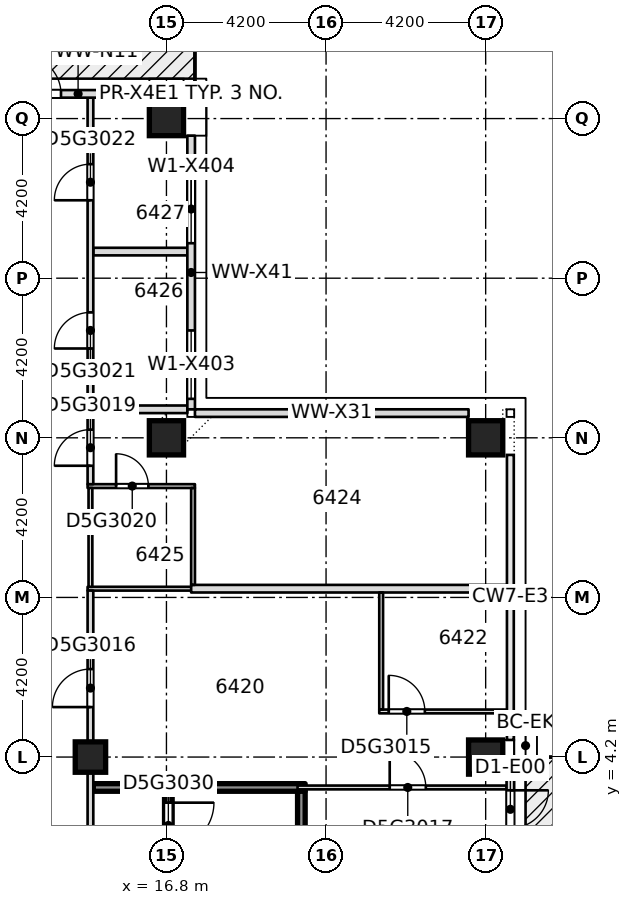
"""IFC4 building model, lengths in metres.
Left out: names, types, materials, properties, quantities, classifications, styles, units other than length and angle.
Written with IfcOpenShell. Run it as: python <this file> out.ifc"""

import sys

from ifc_helpers import new_model, si_unit, direction, frame, frame_2d, origin, origin_2d, place, context, subcontext, project, spatial, rectangle, extrude, element, fill, save


model = new_model("IFC4")
c1 = context("Model", 3, precision=1e-05, world=origin(), true_north=direction((0.0, 1.0)))
c2 = subcontext(c1, "Body", "Model", "MODEL_VIEW")
j1 = project(units=[si_unit("LENGTHUNIT", "METRE"), si_unit("PLANEANGLEUNIT", "RADIAN")], contexts=[c1])
p1 = place(None, origin())
s1 = spatial("IfcSite", under=j1, at=p1, CompositionType="ELEMENT")
p2 = place(p1, origin())
s2 = spatial("IfcBuilding", under=s1, at=p2, CompositionType="ELEMENT")
p3 = place(p2, frame((0.0, 0.0, 244.15)))
s3 = spatial("IfcBuildingStorey", under=s2, at=p3, CompositionType="ELEMENT", Elevation=244.15)
for number, where, z_axis, x_axis in (
    (1, (25.2, 4.2, -0.4), (0.0, 0.0, 1.0), (1.0, 0.0, 0.0)),
    (2, (16.8, 12.6, -0.4), (0.0, 0.0, 1.0), (1.0, 0.0, 0.0)),
    (3, (25.2, 12.6, -0.4), (0.0, 0.0, 1.0), (1.0, 0.0, 0.0)),
    (4, (16.8, 21.0, -0.4), (0.0, 0.0, 1.0), (1.0, 0.0, 0.0)),
):
    element("IfcColumn", number, at=place(p3, frame(where, z_axis=z_axis, x_axis=x_axis)), inside=s3, PredefinedType="COLUMN", context=c2, shape_type="SweptSolid", body=[
        extrude(rectangle(XDim=0.9, YDim=0.9, at=origin_2d()), origin(), (0.0, 0.0, 1.0), 3.45),
    ])
p4 = place(p3, frame((14.8, 4.2, -0.4), z_axis=(0.0, 0.0, 1.0), x_axis=(1.0, 0.0, 0.0)))
e5 = element("IfcColumn", 5, at=p4, inside=s3, PredefinedType="COLUMN", context=c2, shape_type="SweptSolid", body=[
    extrude(rectangle(XDim=0.8, YDim=0.8, at=origin_2d()), origin(), (0.0, 0.0, 1.0), 3.45),
])
p5 = place(p3, frame((14.875, 3.4, 0.0), z_axis=(0.0, 0.0, 1.0), x_axis=(1.0, 0.0, 0.0)))
e6 = element("IfcWall", 6, at=p5, inside=s3, PredefinedType="SOLIDWALL", context=c2, shape_type="SweptSolid", body=[
    extrude(rectangle(XDim=5.575, YDim=0.2, at=frame_2d((2.788, 0.0))), origin(), (0.0, 0.0, 1.0), 3.05),
])
p6 = place(p3, frame((20.25, 3.4, 0.0), z_axis=(0.0, 0.0, 1.0), x_axis=(1.0, 0.0, 0.0)))
e7 = element("IfcWall", 7, at=p6, inside=s3, PredefinedType="PARTITIONING", context=c2, shape_type="SweptSolid", body=[
    extrude(rectangle(XDim=5.5, YDim=0.1, at=frame_2d((2.75, 0.0))), origin(), (0.0, 0.0, 1.0), 3.05),
])
p7 = place(p6, frame((2.425, 0.0, 0.0)))
e8 = element("IfcOpeningElement", 8, at=p7, cuts=e7, PredefinedType="OPENING", context=c2, shape_type="SweptSolid", body=[
    extrude(rectangle(XDim=0.95, YDim=2.1, at=frame_2d((0.475, 1.05))), frame((0.0, 0.06, 0.0), z_axis=(0.0, -1.0, 0.0), x_axis=(1.0, 0.0, 0.0)), (0.0, 0.0, 1.0), 0.12),
])
p8 = place(p3, frame((22.4, 5.4, 0.0), z_axis=(0.0, 0.0, 1.0), x_axis=(1.0, 0.0, 0.0)))
e9 = element("IfcWall", 9, at=p8, inside=s3, PredefinedType="PARTITIONING", context=c2, shape_type="SweptSolid", body=[
    extrude(rectangle(XDim=3.35, YDim=0.1, at=frame_2d((1.675, 0.0))), origin(), (0.0, 0.0, 1.0), 3.05),
])
p9 = place(p8, frame((0.25, 0.0, 0.0)))
e10 = element("IfcOpeningElement", 10, at=p9, cuts=e9, PredefinedType="OPENING", context=c2, shape_type="SweptSolid", body=[
    extrude(rectangle(XDim=0.95, YDim=2.1, at=frame_2d((0.475, 1.05))), frame((0.0, 0.06, 0.0), z_axis=(0.0, -1.0, 0.0), x_axis=(1.0, 0.0, 0.0)), (0.0, 0.0, 1.0), 0.12),
])
p10 = place(p3, frame((14.725, 8.63, 0.0), z_axis=(0.0, 0.0, 1.0), x_axis=(1.0, 0.0, 0.0)))
e11 = element("IfcWall", 11, at=p10, inside=s3, PredefinedType="PARTITIONING", context=c2, shape_type="SweptSolid", body=[
    extrude(rectangle(XDim=2.825, YDim=0.1, at=frame_2d((1.413, 0.0))), origin(), (0.0, 0.0, 1.0), 3.05),
])
p11 = place(p3, frame((17.45, 8.63, 0.0), z_axis=(0.0, 0.0, 1.0), x_axis=(1.0, 0.0, 0.0)))
e12 = element("IfcWall", 12, at=p11, inside=s3, PredefinedType="PARTITIONING", context=c2, shape_type="SweptSolid", body=[
    extrude(rectangle(XDim=8.3, YDim=0.2, at=frame_2d((4.15, 0.0))), origin(), (0.0, 0.0, 1.0), 3.05),
])
p12 = place(p3, frame((14.725, 11.33, 0.0), z_axis=(0.0, 0.0, 1.0), x_axis=(1.0, 0.0, 0.0)))
e13 = element("IfcWall", 13, at=p12, inside=s3, PredefinedType="PARTITIONING", context=c2, shape_type="SweptSolid", body=[
    extrude(rectangle(XDim=2.825, YDim=0.1, at=frame_2d((1.413, 0.0))), origin(), (0.0, 0.0, 1.0), 3.05),
])
p13 = place(p12, frame((0.75, 0.0, 0.0)))
e14 = element("IfcOpeningElement", 14, at=p13, cuts=e13, PredefinedType="OPENING", context=c2, shape_type="SweptSolid", body=[
    extrude(rectangle(XDim=0.85, YDim=2.1, at=frame_2d((0.425, 1.05))), frame((0.0, 0.06, 0.0), z_axis=(0.0, -1.0, 0.0), x_axis=(1.0, 0.0, 0.0)), (0.0, 0.0, 1.0), 0.12),
])
for number, where, z_axis, x_axis in (
    (15, (14.875, 13.35, 0.0), (0.0, 0.0, 1.0), (1.0, 0.0, 0.0)),
    (16, (14.875, 17.5, 0.0), (0.0, 0.0, 1.0), (1.0, 0.0, 0.0)),
):
    element("IfcWall", number, at=place(p3, frame(where, z_axis=z_axis, x_axis=x_axis)), inside=s3, PredefinedType="PARTITIONING", context=c2, shape_type="SweptSolid", body=[
        extrude(rectangle(XDim=2.475, YDim=0.2, at=frame_2d((1.238, 0.0))), origin(), (0.0, 0.0, 1.0), 3.05),
    ])
p14 = place(p3, frame((14.8, -10.45, 0.0), z_axis=(0.0, 0.0, 1.0), x_axis=(0.0, 1.0, 0.0)))
e17 = element("IfcWall", 17, at=p14, inside=s3, PredefinedType="PARTITIONING", context=c2, shape_type="SweptSolid", body=[
    extrude(rectangle(XDim=19.03, YDim=0.15, at=frame_2d((9.515, 0.0))), origin(), (0.0, 0.0, 1.0), 3.05),
])
p15 = place(p14, frame((0.9, 0.0, 0.0)))
e18 = element("IfcOpeningElement", 18, at=p15, cuts=e17, PredefinedType="OPENING", context=c2, shape_type="SweptSolid", body=[
    extrude(rectangle(XDim=0.95, YDim=2.1, at=frame_2d((0.475, 1.05))), frame((0.0, 0.085, 0.0), z_axis=(0.0, -1.0, 0.0), x_axis=(1.0, 0.0, 0.0)), (0.0, 0.0, 1.0), 0.17),
])
p16 = place(p14, frame((15.965, 0.0, 0.0)))
e19 = element("IfcOpeningElement", 19, at=p16, cuts=e17, PredefinedType="OPENING", context=c2, shape_type="SweptSolid", body=[
    extrude(rectangle(XDim=1.0, YDim=2.1, at=frame_2d((0.5, 1.05))), frame((0.0, 0.085, 0.0), z_axis=(0.0, -1.0, 0.0), x_axis=(1.0, 0.0, 0.0)), (0.0, 0.0, 1.0), 0.17),
])
p17 = place(p14, frame((9.9, 0.0, 0.0)))
e20 = element("IfcOpeningElement", 20, at=p17, cuts=e17, PredefinedType="OPENING", context=c2, shape_type="SweptSolid", body=[
    extrude(rectangle(XDim=1.1, YDim=2.1, at=frame_2d((0.55, 1.05))), frame((0.0, 0.085, 0.0), z_axis=(0.0, -1.0, 0.0), x_axis=(1.0, 0.0, 0.0)), (0.0, 0.0, 1.0), 0.17),
])
p18 = place(p14, frame((4.75, 0.0, 0.0)))
e21 = element("IfcOpeningElement", 21, at=p18, cuts=e17, PredefinedType="OPENING", context=c2, shape_type="SweptSolid", body=[
    extrude(rectangle(XDim=1.0, YDim=2.1, at=frame_2d((0.5, 1.05))), frame((0.0, 0.085, 0.0), z_axis=(0.0, -1.0, 0.0), x_axis=(1.0, 0.0, 0.0)), (0.0, 0.0, 1.0), 0.17),
])
p19 = place(p3, frame((14.8, 8.68, 0.0), z_axis=(0.0, 0.0, 1.0), x_axis=(0.0, 1.0, 0.0)))
e22 = element("IfcWall", 22, at=p19, inside=s3, PredefinedType="PARTITIONING", context=c2, shape_type="SweptSolid", body=[
    extrude(rectangle(XDim=2.6, YDim=0.1, at=frame_2d((1.3, 0.0))), origin(), (0.0, 0.0, 1.0), 3.05),
])
p20 = place(p3, frame((14.8, 11.38, 0.0), z_axis=(0.0, 0.0, 1.0), x_axis=(0.0, 1.0, 0.0)))
e23 = element("IfcWall", 23, at=p20, inside=s3, PredefinedType="PARTITIONING", context=c2, shape_type="SweptSolid", body=[
    extrude(rectangle(XDim=10.17, YDim=0.15, at=frame_2d((5.085, 0.0))), origin(), (0.0, 0.0, 1.0), 3.05),
])
p21 = place(p20, frame((0.485, 0.0, 0.0)))
e24 = element("IfcOpeningElement", 24, at=p21, cuts=e23, PredefinedType="OPENING", context=c2, shape_type="SweptSolid", body=[
    extrude(rectangle(XDim=0.95, YDim=2.1, at=frame_2d((0.475, 1.05))), frame((0.0, 0.085, 0.0), z_axis=(0.0, -1.0, 0.0), x_axis=(1.0, 0.0, 0.0)), (0.0, 0.0, 1.0), 0.17),
])
p22 = place(p20, frame((3.57, 0.0, 0.0)))
e25 = element("IfcOpeningElement", 25, at=p22, cuts=e23, PredefinedType="OPENING", context=c2, shape_type="SweptSolid", body=[
    extrude(rectangle(XDim=0.95, YDim=2.1, at=frame_2d((0.475, 1.05))), frame((0.0, 0.085, 0.0), z_axis=(0.0, -1.0, 0.0), x_axis=(1.0, 0.0, 0.0)), (0.0, 0.0, 1.0), 0.17),
])
p23 = place(p20, frame((7.47, 0.0, 0.0)))
e26 = element("IfcOpeningElement", 26, at=p23, cuts=e23, PredefinedType="OPENING", context=c2, shape_type="SweptSolid", body=[
    extrude(rectangle(XDim=0.95, YDim=2.1, at=frame_2d((0.475, 1.05))), frame((0.0, 0.085, 0.0), z_axis=(0.0, -1.0, 0.0), x_axis=(1.0, 0.0, 0.0)), (0.0, 0.0, 1.0), 0.17),
])
p24 = place(p3, frame((16.85, -3.3, 0.0), z_axis=(0.0, 0.0, 1.0), x_axis=(0.0, 1.0, 0.0)))
e27 = element("IfcWall", 27, at=p24, inside=s3, PredefinedType="SOLIDWALL", context=c2, shape_type="SweptSolid", body=[
    extrude(rectangle(XDim=6.6, YDim=0.2, at=frame_2d((3.3, 0.0))), origin(), (0.0, 0.0, 1.0), 3.05),
])
p25 = place(p24, frame((5.1, 0.0, 0.0)))
e28 = element("IfcOpeningElement", 28, at=p25, cuts=e27, PredefinedType="OPENING", context=c2, shape_type="SweptSolid", body=[
    extrude(rectangle(XDim=1.2, YDim=2.1, at=frame_2d((0.6, 1.05))), frame((0.0, 0.11, 0.0), z_axis=(0.0, -1.0, 0.0), x_axis=(1.0, 0.0, 0.0)), (0.0, 0.0, 1.0), 0.22),
])
p26 = place(p3, frame((17.5, 8.73, 0.0), z_axis=(0.0, 0.0, 1.0), x_axis=(0.0, 1.0, 0.0)))
e29 = element("IfcWall", 29, at=p26, inside=s3, PredefinedType="PARTITIONING", context=c2, shape_type="SweptSolid", body=[
    extrude(rectangle(XDim=2.55, YDim=0.1, at=frame_2d((1.275, 0.0))), origin(), (0.0, 0.0, 1.0), 3.05),
])
p27 = place(p3, frame((20.35, -0.53, 0.0), z_axis=(0.0, 0.0, 1.0), x_axis=(0.0, 1.0, 0.0)))
e30 = element("IfcWall", 30, at=p27, inside=s3, PredefinedType="SOLIDWALL", context=c2, shape_type="SweptSolid", body=[
    extrude(rectangle(XDim=3.83, YDim=0.2, at=frame_2d((1.915, 0.0))), origin(), (0.0, 0.0, 1.0), 3.05),
])
p28 = place(p3, frame((22.45, 5.45, 0.0), z_axis=(0.0, 0.0, 1.0), x_axis=(0.0, 1.0, 0.0)))
e31 = element("IfcWall", 31, at=p28, inside=s3, PredefinedType="PARTITIONING", context=c2, shape_type="SweptSolid", body=[
    extrude(rectangle(XDim=3.08, YDim=0.1, at=frame_2d((1.54, 0.0))), origin(), (0.0, 0.0, 1.0), 3.05),
])
p29 = place(p3, frame((25.85, -3.75, 0.0), z_axis=(0.0, 0.0, 1.0), x_axis=(0.0, 1.0, 0.0)))
e32 = element("IfcWall", 32, at=p29, inside=s3, PredefinedType="STANDARD", context=c2, shape_type="SweptSolid", body=[
    extrude(rectangle(XDim=7.5, YDim=0.2, at=frame_2d((3.75, 0.0))), origin(), (0.0, 0.0, 1.0), 3.05),
])
p30 = place(p29, frame((0.425, 0.0, 0.2)))
e33 = element("IfcOpeningElement", 33, at=p30, cuts=e32, PredefinedType="OPENING", context=c2, shape_type="SweptSolid", body=[
    extrude(rectangle(XDim=1.8, YDim=2.65, at=frame_2d((0.9, 1.325))), frame((0.0, 0.11, 0.0), z_axis=(0.0, -1.0, 0.0), x_axis=(1.0, 0.0, 0.0)), (0.0, 0.0, 1.0), 0.22),
])
p31 = place(p29, frame((2.325, 0.0, 0.0)))
e34 = element("IfcOpeningElement", 34, at=p31, cuts=e32, PredefinedType="OPENING", context=c2, shape_type="SweptSolid", body=[
    extrude(rectangle(XDim=1.0, YDim=2.4, at=frame_2d((0.5, 1.2))), frame((0.0, 0.11, 0.0), z_axis=(0.0, -1.0, 0.0), x_axis=(1.0, 0.0, 0.0)), (0.0, 0.0, 1.0), 0.22),
])
p32 = place(p29, frame((4.175, 0.0, 0.2)))
e35 = element("IfcOpeningElement", 35, at=p32, cuts=e32, PredefinedType="OPENING", context=c2, shape_type="SweptSolid", body=[
    extrude(rectangle(XDim=1.8, YDim=2.65, at=frame_2d((0.9, 1.325))), frame((0.0, 0.11, 0.0), z_axis=(0.0, -1.0, 0.0), x_axis=(1.0, 0.0, 0.0)), (0.0, 0.0, 1.0), 0.22),
])
p33 = place(p29, frame((6.075, 0.0, 0.0)))
e36 = element("IfcOpeningElement", 36, at=p33, cuts=e32, PredefinedType="OPENING", context=c2, shape_type="SweptSolid", body=[
    extrude(rectangle(XDim=1.0, YDim=2.4, at=frame_2d((0.5, 1.2))), frame((0.0, 0.11, 0.0), z_axis=(0.0, -1.0, 0.0), x_axis=(1.0, 0.0, 0.0)), (0.0, 0.0, 1.0), 0.22),
])
p34 = place(p3, frame((24.75, 13.25, 0.0), z_axis=(0.0, 0.0, 1.0), x_axis=(-1.0, 0.0, 0.0)))
e37 = element("IfcWall", 37, at=p34, inside=s3, PredefinedType="STANDARD", context=c2, shape_type="SweptSolid", body=[
    extrude(rectangle(XDim=7.2, YDim=0.2, at=frame_2d((3.6, 0.0))), origin(), (0.0, 0.0, 1.0), 3.05),
])
p35 = place(p3, frame((17.45, 13.35, 0.0), z_axis=(0.0, 0.0, 1.0), x_axis=(0.0, 1.0, 0.0)))
e38 = element("IfcWall", 38, at=p35, inside=s3, PredefinedType="STANDARD", context=c2, shape_type="SweptSolid", body=[
    extrude(rectangle(XDim=7.2, YDim=0.2, at=frame_2d((3.6, 0.0))), origin(), (0.0, 0.0, 1.0), 3.05),
])
p36 = place(p35, frame((0.275, 0.0, 0.2)))
e39 = element("IfcOpeningElement", 39, at=p36, cuts=e38, PredefinedType="OPENING", context=c2, shape_type="SweptSolid", body=[
    extrude(rectangle(XDim=1.8, YDim=2.65, at=frame_2d((0.9, 1.325))), frame((0.0, 0.11, 0.0), z_axis=(0.0, -1.0, 0.0), x_axis=(1.0, 0.0, 0.0)), (0.0, 0.0, 1.0), 0.22),
])
p37 = place(p35, frame((4.37, 0.0, 0.2)))
e40 = element("IfcOpeningElement", 40, at=p37, cuts=e38, PredefinedType="OPENING", context=c2, shape_type="SweptSolid", body=[
    extrude(rectangle(XDim=1.8, YDim=2.65, at=frame_2d((0.9, 1.325))), frame((0.0, 0.11, 0.0), z_axis=(0.0, -1.0, 0.0), x_axis=(1.0, 0.0, 0.0)), (0.0, 0.0, 1.0), 0.22),
])
p38 = place(p3, frame((16.35, 21.65, 0.0), z_axis=(0.0, 0.0, 1.0), x_axis=(-1.0, 0.0, 0.0)))
e41 = element("IfcWall", 41, at=p38, inside=s3, PredefinedType="STANDARD", context=c2, shape_type="SweptSolid", body=[
    extrude(rectangle(XDim=3.75, YDim=0.2, at=frame_2d((1.875, 0.0))), origin(), (0.0, 0.0, 1.0), 3.05),
])
p39 = place(p38, frame((2.325, 0.0, 0.0)))
e42 = element("IfcOpeningElement", 42, at=p39, cuts=e41, PredefinedType="OPENING", context=c2, shape_type="SweptSolid", body=[
    extrude(rectangle(XDim=1.0, YDim=2.4, at=frame_2d((0.5, 1.2))), frame((0.0, 0.11, 0.0), z_axis=(0.0, -1.0, 0.0), x_axis=(1.0, 0.0, 0.0)), (0.0, 0.0, 1.0), 0.22),
])
p40 = place(p9, origin())
e43 = element("IfcDoor", 43, at=p40, inside=s3, OperationType="SINGLE_SWING_LEFT", PredefinedType="DOOR", context=c2, shape_type="SweptSolid", body=[
    extrude(rectangle(XDim=0.95, YDim=2.1, at=frame_2d((0.475, 1.05))), frame((0.0, 0.025, 0.0), z_axis=(0.0, -1.0, 0.0), x_axis=(1.0, 0.0, 0.0)), (0.0, 0.0, 1.0), 0.05),
])
fill(e10, e43)
p41 = place(p16, origin())
e44 = element("IfcDoor", 44, at=p41, inside=s3, OperationType="SINGLE_SWING_LEFT", PredefinedType="DOOR", context=c2, shape_type="SweptSolid", body=[
    extrude(rectangle(XDim=1.0, YDim=2.1, at=frame_2d((0.5, 1.05))), frame((0.0, 0.025, 0.0), z_axis=(0.0, -1.0, 0.0), x_axis=(1.0, 0.0, 0.0)), (0.0, 0.0, 1.0), 0.05),
])
fill(e19, e44)
p42 = place(p7, origin())
e45 = element("IfcDoor", 45, at=p42, inside=s3, OperationType="SINGLE_SWING_LEFT", PredefinedType="DOOR", context=c2, shape_type="SweptSolid", body=[
    extrude(rectangle(XDim=0.95, YDim=2.1, at=frame_2d((0.475, 1.05))), frame((0.0, 0.025, 0.0), z_axis=(0.0, -1.0, 0.0), x_axis=(1.0, 0.0, 0.0)), (0.0, 0.0, 1.0), 0.05),
])
fill(e8, e45)
p43 = place(p21, origin())
e46 = element("IfcDoor", 46, at=p43, inside=s3, OperationType="SINGLE_SWING_RIGHT", PredefinedType="DOOR", context=c2, shape_type="SweptSolid", body=[
    extrude(rectangle(XDim=0.95, YDim=2.1, at=frame_2d((0.475, 1.05))), frame((0.0, 0.025, 0.0), z_axis=(0.0, -1.0, 0.0), x_axis=(1.0, 0.0, 0.0)), (0.0, 0.0, 1.0), 0.05),
])
fill(e24, e46)
p44 = place(p13, origin())
e47 = element("IfcDoor", 47, at=p44, inside=s3, OperationType="SINGLE_SWING_RIGHT", PredefinedType="DOOR", context=c2, shape_type="SweptSolid", body=[
    extrude(rectangle(XDim=0.85, YDim=2.1, at=frame_2d((0.425, 1.05))), frame((0.0, 0.025, 0.0), z_axis=(0.0, -1.0, 0.0), x_axis=(1.0, 0.0, 0.0)), (0.0, 0.0, 1.0), 0.05),
])
fill(e14, e47)
p45 = place(p22, origin())
e48 = element("IfcDoor", 48, at=p45, inside=s3, OperationType="SINGLE_SWING_RIGHT", PredefinedType="DOOR", context=c2, shape_type="SweptSolid", body=[
    extrude(rectangle(XDim=0.95, YDim=2.1, at=frame_2d((0.475, 1.05))), frame((0.0, 0.025, 0.0), z_axis=(0.0, -1.0, 0.0), x_axis=(1.0, 0.0, 0.0)), (0.0, 0.0, 1.0), 0.05),
])
fill(e25, e48)
p46 = place(p23, origin())
e49 = element("IfcDoor", 49, at=p46, inside=s3, OperationType="SINGLE_SWING_RIGHT", PredefinedType="DOOR", context=c2, shape_type="SweptSolid", body=[
    extrude(rectangle(XDim=0.95, YDim=2.1, at=frame_2d((0.475, 1.05))), frame((0.0, 0.025, 0.0), z_axis=(0.0, -1.0, 0.0), x_axis=(1.0, 0.0, 0.0)), (0.0, 0.0, 1.0), 0.05),
])
fill(e26, e49)
p47 = place(p25, origin())
e50 = element("IfcDoor", 50, at=p47, inside=s3, OperationType="SINGLE_SWING_LEFT", PredefinedType="DOOR", context=c2, shape_type="SweptSolid", body=[
    extrude(rectangle(XDim=1.2, YDim=2.1, at=frame_2d((0.6, 1.05))), frame((0.0, 0.025, 0.0), z_axis=(0.0, -1.0, 0.0), x_axis=(1.0, 0.0, 0.0)), (0.0, 0.0, 1.0), 0.05),
])
fill(e28, e50)
p48 = place(p33, origin())
e51 = element("IfcDoor", 51, at=p48, inside=s3, OperationType="SINGLE_SWING_LEFT", PredefinedType="DOOR", context=c2, shape_type="SweptSolid", body=[
    extrude(rectangle(XDim=1.0, YDim=2.4, at=frame_2d((0.5, 1.2))), frame((0.0, 0.025, 0.0), z_axis=(0.0, -1.0, 0.0), x_axis=(1.0, 0.0, 0.0)), (0.0, 0.0, 1.0), 0.05),
])
fill(e36, e51)
p49 = place(p36, origin())
e52 = element("IfcWindow", 52, at=p49, inside=s3, PartitioningType="SINGLE_PANEL", PredefinedType="WINDOW", context=c2, shape_type="SweptSolid", body=[
    extrude(rectangle(XDim=1.8, YDim=2.65, at=frame_2d((0.9, 1.325))), frame((0.0, 0.03, 0.0), z_axis=(0.0, -1.0, 0.0), x_axis=(1.0, 0.0, 0.0)), (0.0, 0.0, 1.0), 0.06),
])
fill(e39, e52)
p50 = place(p37, origin())
e53 = element("IfcWindow", 53, at=p50, inside=s3, PartitioningType="SINGLE_PANEL", PredefinedType="WINDOW", context=c2, shape_type="SweptSolid", body=[
    extrude(rectangle(XDim=1.8, YDim=2.65, at=frame_2d((0.9, 1.325))), frame((0.0, 0.03, 0.0), z_axis=(0.0, -1.0, 0.0), x_axis=(1.0, 0.0, 0.0)), (0.0, 0.0, 1.0), 0.06),
])
fill(e40, e53)
p51 = place(p39, origin())
e54 = element("IfcDoor", 54, at=p51, inside=s3, OperationType="SINGLE_SWING_LEFT", PredefinedType="DOOR", context=c2, shape_type="SweptSolid", body=[
    extrude(rectangle(XDim=1.0, YDim=2.4, at=frame_2d((0.5, 1.2))), frame((0.0, 0.025, 0.0), z_axis=(0.0, -1.0, 0.0), x_axis=(1.0, 0.0, 0.0)), (0.0, 0.0, 1.0), 0.05),
])
fill(e42, e54)
save(model, sys.argv[1])
